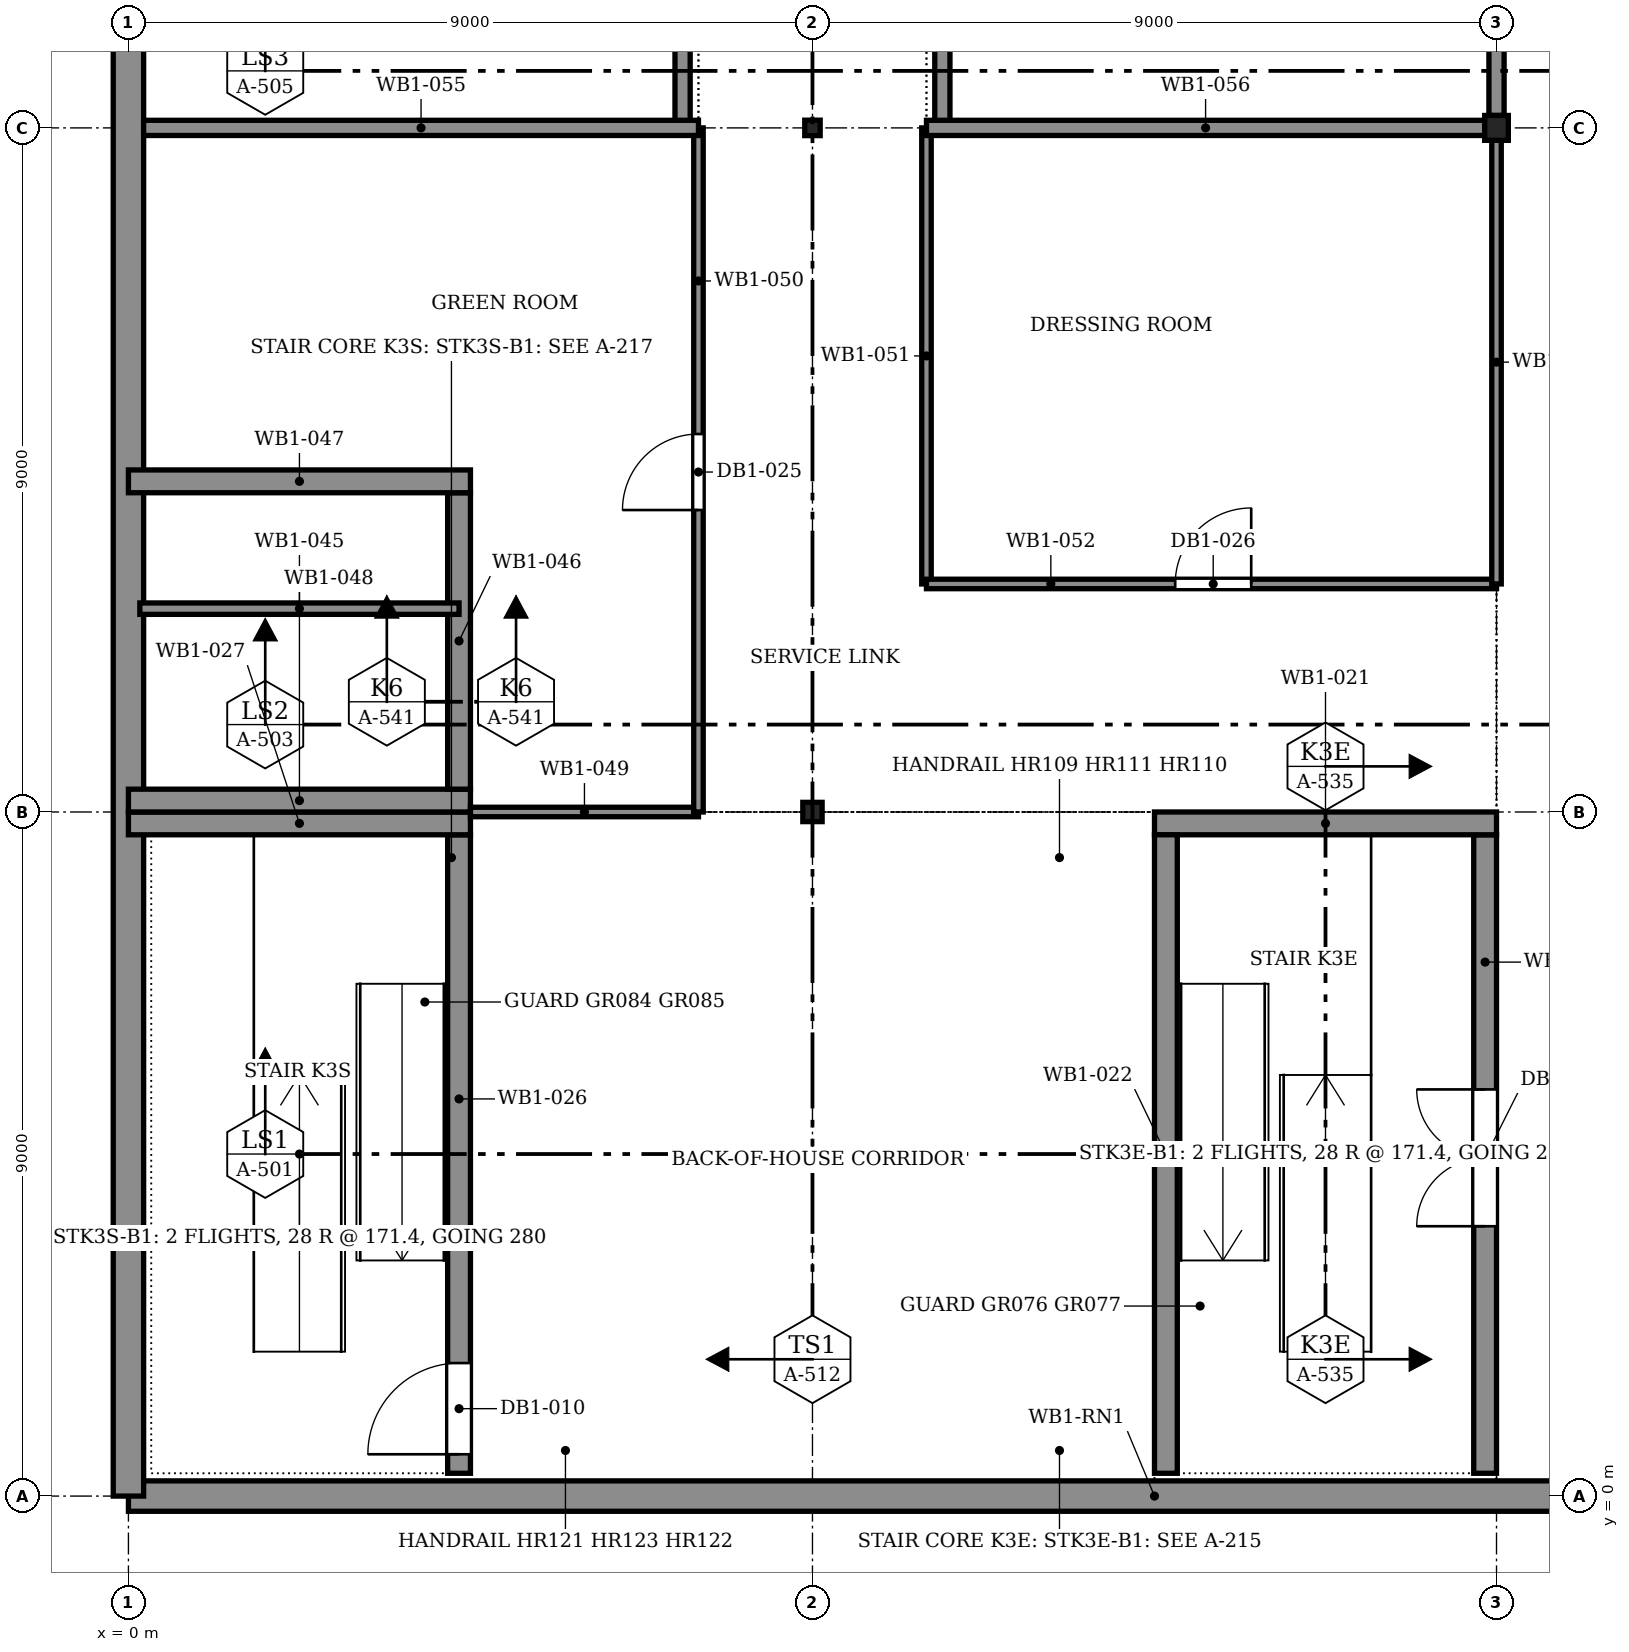
"""IFC4 building model, lengths in metres.
Left out: names, types, materials, properties, quantities, classifications, styles, units other than length and angle.
Written with IfcOpenShell. Run it as: python <this file> out.ifc"""

import sys

from ifc_helpers import new_model, si_unit, direction, frame, frame_2d, origin, origin_with_axes, origin_2d, place, context, subcontext, project, spatial, rectangle, i_section, extrude, element, fill, save


model = new_model("IFC4")
c1 = context("Model", 3, precision=1e-05, world=origin(), true_north=direction((0.0, 1.0)))
c2 = subcontext(c1, "Body", "Model", "MODEL_VIEW")
j1 = project(units=[si_unit("LENGTHUNIT", "METRE"), si_unit("PLANEANGLEUNIT", "RADIAN")], contexts=[c1])
p1 = place(None, origin())
s1 = spatial("IfcSite", under=j1, at=p1, CompositionType="ELEMENT")
p2 = place(p1, origin())
s2 = spatial("IfcBuilding", under=s1, at=p2, CompositionType="ELEMENT")
p3 = place(p2, frame((0.0, 0.0, -4.8)))
s3 = spatial("IfcBuildingStorey", under=s2, at=p3, CompositionType="ELEMENT", Elevation=-4.8)
p4 = place(p3, origin_with_axes())
e1 = element("IfcWall", 1, at=p4, inside=s3, PredefinedType="SOLIDWALL", context=c2, shape_type="SweptSolid", body=[
    extrude(rectangle(XDim=27.0, YDim=0.4, at=frame_2d((13.5, 0.0))), origin(), (0.0, 0.0, 1.0), 4.8),
])
p5 = place(p3, frame((0.0, 0.0, 0.0), z_axis=(0.0, 0.0, 1.0), x_axis=(0.0, 1.0, 0.0)))
e2 = element("IfcWall", 2, at=p5, inside=s3, PredefinedType="SOLIDWALL", context=c2, shape_type="SweptSolid", body=[
    extrude(rectangle(XDim=45.0, YDim=0.4, at=frame_2d((22.5, 0.0))), origin(), (0.0, 0.0, 1.0), 4.8),
])
p6 = place(p3, frame((9.0, 9.0, -0.6), z_axis=(0.0, 0.0, 1.0), x_axis=(1.0, 0.0, 0.0)))
e3 = element("IfcColumn", 3, at=p6, inside=s3, PredefinedType="COLUMN", context=c2, shape_type="SweptSolid", body=[
    extrude(i_section(OverallWidth=0.254, OverallDepth=0.254, WebThickness=0.009, FlangeThickness=0.014, FilletRadius=0.014, at=origin_2d()), origin(), (0.0, 0.0, 1.0), 5.4),
])
p7 = place(p3, frame((9.0, 18.0, -0.6), z_axis=(0.0, 0.0, 1.0), x_axis=(1.0, 0.0, 0.0)))
e4 = element("IfcColumn", 4, at=p7, inside=s3, PredefinedType="COLUMN", context=c2, shape_type="SweptSolid", body=[
    extrude(i_section(OverallWidth=0.203, OverallDepth=0.203, WebThickness=0.007, FlangeThickness=0.011, FilletRadius=0.011, at=origin_2d()), origin(), (0.0, 0.0, 1.0), 5.4),
])
p8 = place(p3, frame((18.0, 18.0, -0.6), z_axis=(0.0, 0.0, 1.0), x_axis=(1.0, 0.0, 0.0)))
e5 = element("IfcColumn", 5, at=p8, inside=s3, PredefinedType="COLUMN", context=c2, shape_type="SweptSolid", body=[
    extrude(i_section(OverallWidth=0.311, OverallDepth=0.327, WebThickness=0.016, FlangeThickness=0.025, FilletRadius=0.017, at=origin_2d()), origin(), (0.0, 0.0, 1.0), 5.4),
])
p9 = place(p3, frame((17.85, 0.3, 0.0), z_axis=(0.0, 0.0, 1.0), x_axis=(0.0, 1.0, 0.0)))
e6 = element("IfcWall", 6, at=p9, inside=s3, PredefinedType="SOLIDWALL", context=c2, shape_type="SweptSolid", body=[
    extrude(rectangle(XDim=8.4, YDim=0.3, at=frame_2d((4.2, 0.0))), origin(), (0.0, 0.0, 1.0), 4.8),
])
p10 = place(p9, frame((3.25, 0.0, 0.0)))
e7 = element("IfcOpeningElement", 7, at=p10, cuts=e6, PredefinedType="OPENING", context=c2, shape_type="SweptSolid", body=[
    extrude(rectangle(XDim=1.8, YDim=2.1, at=frame_2d((0.9, 1.05))), frame((0.0, 0.16, 0.0), z_axis=(0.0, -1.0, 0.0), x_axis=(1.0, 0.0, 0.0)), (0.0, 0.0, 1.0), 0.32),
])
p11 = place(p3, frame((13.5, 8.85, 0.0), z_axis=(0.0, 0.0, 1.0), x_axis=(1.0, 0.0, 0.0)))
e8 = element("IfcWall", 8, at=p11, inside=s3, PredefinedType="SOLIDWALL", context=c2, shape_type="SweptSolid", body=[
    extrude(rectangle(XDim=4.5, YDim=0.3, at=frame_2d((2.25, 0.0))), origin(), (0.0, 0.0, 1.0), 4.8),
])
p12 = place(p3, frame((13.65, 0.3, 0.0), z_axis=(0.0, 0.0, 1.0), x_axis=(0.0, 1.0, 0.0)))
e9 = element("IfcWall", 9, at=p12, inside=s3, PredefinedType="SOLIDWALL", context=c2, shape_type="SweptSolid", body=[
    extrude(rectangle(XDim=8.4, YDim=0.3, at=frame_2d((4.2, 0.0))), origin(), (0.0, 0.0, 1.0), 4.8),
])
p13 = place(p3, frame((4.35, 0.3, 0.0), z_axis=(0.0, 0.0, 1.0), x_axis=(0.0, 1.0, 0.0)))
e10 = element("IfcWall", 10, at=p13, inside=s3, PredefinedType="SOLIDWALL", context=c2, shape_type="SweptSolid", body=[
    extrude(rectangle(XDim=8.4, YDim=0.3, at=frame_2d((4.2, 0.0))), origin(), (0.0, 0.0, 1.0), 4.8),
])
p14 = place(p13, frame((0.25, 0.0, 0.0)))
e11 = element("IfcOpeningElement", 11, at=p14, cuts=e10, PredefinedType="OPENING", context=c2, shape_type="SweptSolid", body=[
    extrude(rectangle(XDim=1.2, YDim=2.1, at=frame_2d((0.6, 1.05))), frame((0.0, 0.16, 0.0), z_axis=(0.0, -1.0, 0.0), x_axis=(1.0, 0.0, 0.0)), (0.0, 0.0, 1.0), 0.32),
])
for number, where, z_axis, x_axis in (
    (12, (0.0, 8.85, 0.0), (0.0, 0.0, 1.0), (1.0, 0.0, 0.0)),
    (13, (0.0, 9.15, 0.0), (0.0, 0.0, 1.0), (1.0, 0.0, 0.0)),
):
    element("IfcWall", number, at=place(p3, frame(where, z_axis=z_axis, x_axis=x_axis)), inside=s3, PredefinedType="SOLIDWALL", context=c2, shape_type="SweptSolid", body=[
        extrude(rectangle(XDim=4.5, YDim=0.3, at=frame_2d((2.25, 0.0))), origin(), (0.0, 0.0, 1.0), 4.8),
    ])
p15 = place(p3, frame((4.35, 9.3, 0.0), z_axis=(0.0, 0.0, 1.0), x_axis=(0.0, 1.0, 0.0)))
e14 = element("IfcWall", 14, at=p15, inside=s3, PredefinedType="SOLIDWALL", context=c2, shape_type="SweptSolid", body=[
    extrude(rectangle(XDim=3.9, YDim=0.3, at=frame_2d((1.95, 0.0))), origin(), (0.0, 0.0, 1.0), 4.8),
])
p16 = place(p3, frame((0.0, 13.35, 0.0), z_axis=(0.0, 0.0, 1.0), x_axis=(1.0, 0.0, 0.0)))
e15 = element("IfcWall", 15, at=p16, inside=s3, PredefinedType="SOLIDWALL", context=c2, shape_type="SweptSolid", body=[
    extrude(rectangle(XDim=4.5, YDim=0.3, at=frame_2d((2.25, 0.0))), origin(), (0.0, 0.0, 1.0), 4.8),
])
p17 = place(p3, frame((0.15, 11.675, 0.0), z_axis=(0.0, 0.0, 1.0), x_axis=(1.0, 0.0, 0.0)))
e16 = element("IfcWall", 16, at=p17, inside=s3, PredefinedType="SOLIDWALL", context=c2, shape_type="SweptSolid", body=[
    extrude(rectangle(XDim=4.2, YDim=0.15, at=frame_2d((2.1, 0.0))), origin(), (0.0, 0.0, 1.0), 4.8),
])
p18 = place(p3, frame((4.5, 9.0, 0.0), z_axis=(0.0, 0.0, 1.0), x_axis=(1.0, 0.0, 0.0)))
e17 = element("IfcWall", 17, at=p18, inside=s3, PredefinedType="PARTITIONING", context=c2, shape_type="SweptSolid", body=[
    extrude(rectangle(XDim=3.0, YDim=0.125, at=frame_2d((1.5, 0.0))), origin(), (0.0, 0.0, 1.0), 4.023),
])
p19 = place(p3, frame((7.5, 9.0, 0.0), z_axis=(0.0, 0.0, 1.0), x_axis=(0.0, 1.0, 0.0)))
e18 = element("IfcWall", 18, at=p19, inside=s3, PredefinedType="PARTITIONING", context=c2, shape_type="SweptSolid", body=[
    extrude(rectangle(XDim=9.0, YDim=0.125, at=frame_2d((4.5, 0.0))), origin(), (0.0, 0.0, 1.0), 3.883),
])
p20 = place(p19, frame((3.972, 0.0, 0.0)))
e19 = element("IfcOpeningElement", 19, at=p20, cuts=e18, PredefinedType="OPENING", context=c2, shape_type="SweptSolid", body=[
    extrude(rectangle(XDim=1.0, YDim=2.1, at=frame_2d((0.5, 1.05))), frame((0.0, 0.073, 0.0), z_axis=(0.0, -1.0, 0.0), x_axis=(1.0, 0.0, 0.0)), (0.0, 0.0, 1.0), 0.145),
])
p21 = place(p3, frame((10.5, 12.0, 0.0), z_axis=(0.0, 0.0, 1.0), x_axis=(0.0, 1.0, 0.0)))
e20 = element("IfcWall", 20, at=p21, inside=s3, PredefinedType="PARTITIONING", context=c2, shape_type="SweptSolid", body=[
    extrude(rectangle(XDim=6.0, YDim=0.125, at=frame_2d((3.0, 0.0))), origin(), (0.0, 0.0, 1.0), 3.883),
])
p22 = place(p3, frame((10.5, 12.0, 0.0), z_axis=(0.0, 0.0, 1.0), x_axis=(1.0, 0.0, 0.0)))
e21 = element("IfcWall", 21, at=p22, inside=s3, PredefinedType="PARTITIONING", context=c2, shape_type="SweptSolid", body=[
    extrude(rectangle(XDim=7.5, YDim=0.125, at=frame_2d((3.75, 0.0))), origin(), (0.0, 0.0, 1.0), 4.023),
])
p23 = place(p22, frame((3.272, 0.0, 0.0)))
e22 = element("IfcOpeningElement", 22, at=p23, cuts=e21, PredefinedType="OPENING", context=c2, shape_type="SweptSolid", body=[
    extrude(rectangle(XDim=1.0, YDim=2.1, at=frame_2d((0.5, 1.05))), frame((0.0, 0.073, 0.0), z_axis=(0.0, -1.0, 0.0), x_axis=(1.0, 0.0, 0.0)), (0.0, 0.0, 1.0), 0.145),
])
p24 = place(p3, frame((7.291, 18.0, 0.0), z_axis=(0.0, 0.0, 1.0), x_axis=(0.0, 1.0, 0.0)))
e23 = element("IfcWall", 23, at=p24, inside=s3, PredefinedType="PARTITIONING", context=c2, shape_type="SweptSolid", body=[
    extrude(rectangle(XDim=18.0, YDim=0.2, at=frame_2d((9.0, 0.0))), origin(), (0.0, 0.0, 1.0), 2.6),
])
p25 = place(p24, frame((8.51, 0.0, 0.0)))
e24 = element("IfcOpeningElement", 24, at=p25, cuts=e23, PredefinedType="OPENING", context=c2, shape_type="SweptSolid", body=[
    extrude(rectangle(XDim=1.0, YDim=2.1, at=frame_2d((0.5, 1.05))), frame((0.0, 0.11, 0.0), z_axis=(0.0, -1.0, 0.0), x_axis=(1.0, 0.0, 0.0)), (0.0, 0.0, 1.0), 0.22),
])
p26 = place(p3, frame((10.709, 18.0, 0.0), z_axis=(0.0, 0.0, 1.0), x_axis=(0.0, 1.0, 0.0)))
e25 = element("IfcWall", 25, at=p26, inside=s3, PredefinedType="PARTITIONING", context=c2, shape_type="SweptSolid", body=[
    extrude(rectangle(XDim=18.0, YDim=0.2, at=frame_2d((9.0, 0.0))), origin(), (0.0, 0.0, 1.0), 2.6),
])
p27 = place(p26, frame((8.51, 0.0, 0.0)))
e26 = element("IfcOpeningElement", 26, at=p27, cuts=e25, PredefinedType="OPENING", context=c2, shape_type="SweptSolid", body=[
    extrude(rectangle(XDim=1.0, YDim=2.1, at=frame_2d((0.5, 1.05))), frame((0.0, 0.11, 0.0), z_axis=(0.0, -1.0, 0.0), x_axis=(1.0, 0.0, 0.0)), (0.0, 0.0, 1.0), 0.22),
])
p28 = place(p3, frame((0.2, 18.0, 0.0), z_axis=(0.0, 0.0, 1.0), x_axis=(1.0, 0.0, 0.0)))
e27 = element("IfcWall", 27, at=p28, inside=s3, PredefinedType="PARTITIONING", context=c2, shape_type="SweptSolid", body=[
    extrude(rectangle(XDim=7.3, YDim=0.2, at=frame_2d((3.65, 0.0))), origin(), (0.0, 0.0, 1.0), 2.6),
])
p29 = place(p3, frame((10.5, 18.0, 0.0), z_axis=(0.0, 0.0, 1.0), x_axis=(1.0, 0.0, 0.0)))
e28 = element("IfcWall", 28, at=p29, inside=s3, PredefinedType="PARTITIONING", context=c2, shape_type="SweptSolid", body=[
    extrude(rectangle(XDim=7.344, YDim=0.2, at=frame_2d((3.672, 0.0))), origin(), (0.0, 0.0, 1.0), 2.6),
])
p30 = place(p3, frame((18.0, 12.0, 0.0), z_axis=(0.0, 0.0, 1.0), x_axis=(0.0, 1.0, 0.0)))
e29 = element("IfcWall", 29, at=p30, inside=s3, PredefinedType="PARTITIONING", context=c2, shape_type="SweptSolid", body=[
    extrude(rectangle(XDim=5.836, YDim=0.125, at=frame_2d((2.918, 0.0))), origin(), (0.0, 0.0, 1.0), 4.023),
])
p31 = place(p3, frame((18.0, 18.164, 0.0), z_axis=(0.0, 0.0, 1.0), x_axis=(0.0, 1.0, 0.0)))
e30 = element("IfcWall", 30, at=p31, inside=s3, PredefinedType="PARTITIONING", context=c2, shape_type="SweptSolid", body=[
    extrude(rectangle(XDim=8.963, YDim=0.2, at=frame_2d((4.482, 0.0))), origin(), (0.0, 0.0, 1.0), 2.6),
])
p32 = place(p10, origin())
e31 = element("IfcDoor", 31, at=p32, inside=s3, OperationType="DOUBLE_DOOR_SINGLE_SWING", PredefinedType="DOOR", context=c2, shape_type="SweptSolid", body=[
    extrude(rectangle(XDim=1.8, YDim=2.1, at=frame_2d((0.9, 1.05))), frame((0.0, 0.025, 0.0), z_axis=(0.0, -1.0, 0.0), x_axis=(1.0, 0.0, 0.0)), (0.0, 0.0, 1.0), 0.05),
])
fill(e7, e31)
p33 = place(p14, origin())
e32 = element("IfcDoor", 32, at=p33, inside=s3, OperationType="SINGLE_SWING_RIGHT", PredefinedType="DOOR", context=c2, shape_type="SweptSolid", body=[
    extrude(rectangle(XDim=1.2, YDim=2.1, at=frame_2d((0.6, 1.05))), frame((0.0, 0.025, 0.0), z_axis=(0.0, -1.0, 0.0), x_axis=(1.0, 0.0, 0.0)), (0.0, 0.0, 1.0), 0.05),
])
fill(e11, e32)
p34 = place(p20, origin())
e33 = element("IfcDoor", 33, at=p34, inside=s3, OperationType="SINGLE_SWING_RIGHT", PredefinedType="DOOR", context=c2, shape_type="SweptSolid", body=[
    extrude(rectangle(XDim=1.0, YDim=2.1, at=frame_2d((0.5, 1.05))), frame((0.0, 0.025, 0.0), z_axis=(0.0, -1.0, 0.0), x_axis=(1.0, 0.0, 0.0)), (0.0, 0.0, 1.0), 0.05),
])
fill(e19, e33)
p35 = place(p23, origin())
e34 = element("IfcDoor", 34, at=p35, inside=s3, OperationType="SINGLE_SWING_LEFT", PredefinedType="DOOR", context=c2, shape_type="SweptSolid", body=[
    extrude(rectangle(XDim=1.0, YDim=2.1, at=frame_2d((0.5, 1.05))), frame((0.0, 0.025, 0.0), z_axis=(0.0, -1.0, 0.0), x_axis=(1.0, 0.0, 0.0)), (0.0, 0.0, 1.0), 0.05),
])
fill(e22, e34)
save(model, sys.argv[1])
